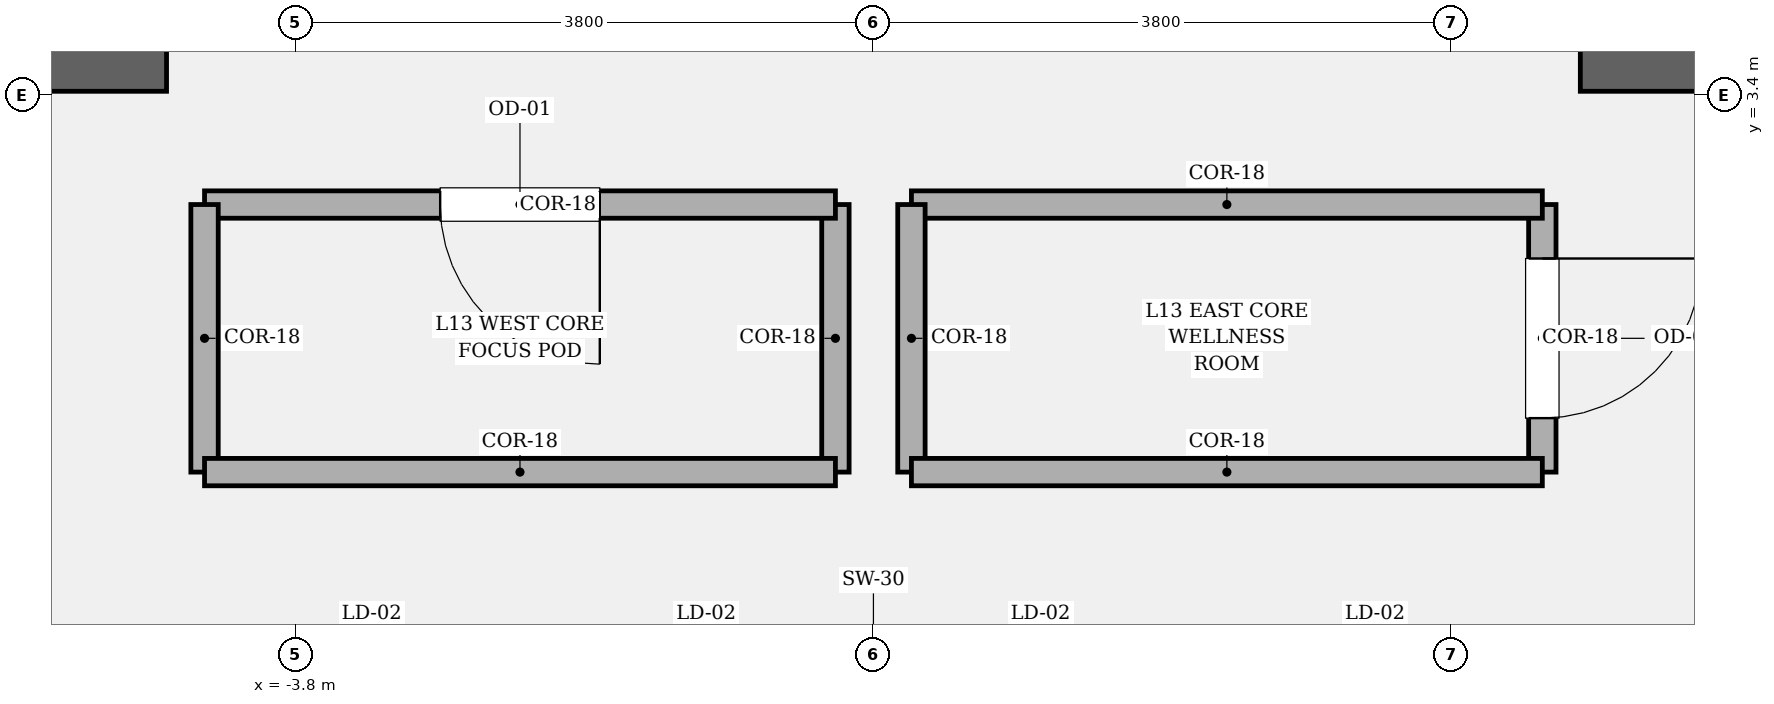
"""IFC4 building model, lengths in metres.
Left out: names, types, materials, properties, quantities, classifications, styles, units other than length and angle.
Written with IfcOpenShell. Run it as: python <this file> out.ifc"""

import sys

from ifc_helpers import new_model, si_unit, direction, frame, frame_2d, origin, place, context, subcontext, project, spatial, rectangle, extrude, element, fill, save


model = new_model("IFC4")
c1 = context("Model", 3, precision=1e-05, world=origin(), true_north=direction((0.0, 1.0)))
c2 = subcontext(c1, "Body", "Model", "MODEL_VIEW")
j1 = project(units=[si_unit("LENGTHUNIT", "METRE"), si_unit("PLANEANGLEUNIT", "RADIAN")], contexts=[c1])
p1 = place(None, origin())
s1 = spatial("IfcSite", under=j1, at=p1, CompositionType="ELEMENT")
p2 = place(p1, origin())
s2 = spatial("IfcBuilding", under=s1, at=p2, CompositionType="ELEMENT")
p3 = place(p2, frame((0.0, 0.0, 60.6)))
s3 = spatial("IfcBuildingStorey", under=s2, at=p3, CompositionType="ELEMENT", Elevation=60.6)
for number, where, z_axis, x_axis in (
    (1, (-9.825, 3.6, 0.0), (0.0, 0.0, 1.0), (1.0, 0.0, 0.0)),
    (2, (4.65, 3.6, 0.0), (0.0, 0.0, 1.0), (1.0, 0.0, 0.0)),
):
    element("IfcWall", number, at=place(p3, frame(where, z_axis=z_axis, x_axis=x_axis)), inside=s3, PredefinedType="SOLIDWALL", context=c2, shape_type="SweptSolid", body=[
        extrude(rectangle(XDim=5.175, YDim=0.35, at=frame_2d((2.587, 0.0))), origin(), (0.0, 0.0, 1.0), 4.05),
    ])
p4 = place(p3, frame((-0.25, 0.92, 0.0), z_axis=(0.0, 0.0, 1.0), x_axis=(0.0, 1.0, 0.0)))
e3 = element("IfcWall", 3, at=p4, inside=s3, PredefinedType="PARTITIONING", context=c2, shape_type="SweptSolid", body=[
    extrude(rectangle(XDim=1.76, YDim=0.18, at=frame_2d((0.88, 0.0))), origin(), (0.0, 0.0, 1.0), 3.81),
])
p5 = place(p3, frame((-0.25, 2.68, 0.0), z_axis=(0.0, 0.0, 1.0), x_axis=(-1.0, 0.0, 0.0)))
e4 = element("IfcWall", 4, at=p5, inside=s3, PredefinedType="PARTITIONING", context=c2, shape_type="SweptSolid", body=[
    extrude(rectangle(XDim=4.15, YDim=0.18, at=frame_2d((2.075, 0.0))), origin(), (0.0, 0.0, 1.0), 3.81),
])
p6 = place(p5, frame((1.55, 0.0, 0.0)))
e5 = element("IfcOpeningElement", 5, at=p6, cuts=e4, PredefinedType="OPENING", context=c2, shape_type="SweptSolid", body=[
    extrude(rectangle(XDim=1.05, YDim=2.2, at=frame_2d((0.525, 1.1))), frame((0.0, 0.1, 0.0), z_axis=(0.0, -1.0, 0.0), x_axis=(1.0, 0.0, 0.0)), (0.0, 0.0, 1.0), 0.2),
])
p7 = place(p3, frame((-4.4, 2.68, 0.0), z_axis=(0.0, 0.0, 1.0), x_axis=(0.0, -1.0, 0.0)))
e6 = element("IfcWall", 6, at=p7, inside=s3, PredefinedType="PARTITIONING", context=c2, shape_type="SweptSolid", body=[
    extrude(rectangle(XDim=1.76, YDim=0.18, at=frame_2d((0.88, 0.0))), origin(), (0.0, 0.0, 1.0), 3.81),
])
p8 = place(p3, frame((-4.4, 0.92, 0.0), z_axis=(0.0, 0.0, 1.0), x_axis=(1.0, 0.0, 0.0)))
e7 = element("IfcWall", 7, at=p8, inside=s3, PredefinedType="PARTITIONING", context=c2, shape_type="SweptSolid", body=[
    extrude(rectangle(XDim=4.15, YDim=0.18, at=frame_2d((2.075, 0.0))), origin(), (0.0, 0.0, 1.0), 3.81),
])
p9 = place(p3, frame((4.4, 0.92, 0.0), z_axis=(0.0, 0.0, 1.0), x_axis=(0.0, 1.0, 0.0)))
e8 = element("IfcWall", 8, at=p9, inside=s3, PredefinedType="PARTITIONING", context=c2, shape_type="SweptSolid", body=[
    extrude(rectangle(XDim=1.76, YDim=0.18, at=frame_2d((0.88, 0.0))), origin(), (0.0, 0.0, 1.0), 3.81),
])
p10 = place(p9, frame((0.355, 0.0, 0.0)))
e9 = element("IfcOpeningElement", 9, at=p10, cuts=e8, PredefinedType="OPENING", context=c2, shape_type="SweptSolid", body=[
    extrude(rectangle(XDim=1.05, YDim=2.2, at=frame_2d((0.525, 1.1))), frame((0.0, 0.1, 0.0), z_axis=(0.0, -1.0, 0.0), x_axis=(1.0, 0.0, 0.0)), (0.0, 0.0, 1.0), 0.2),
])
p11 = place(p3, frame((4.4, 2.68, 0.0), z_axis=(0.0, 0.0, 1.0), x_axis=(-1.0, 0.0, 0.0)))
e10 = element("IfcWall", 10, at=p11, inside=s3, PredefinedType="PARTITIONING", context=c2, shape_type="SweptSolid", body=[
    extrude(rectangle(XDim=4.15, YDim=0.18, at=frame_2d((2.075, 0.0))), origin(), (0.0, 0.0, 1.0), 3.81),
])
p12 = place(p3, frame((0.25, 2.68, 0.0), z_axis=(0.0, 0.0, 1.0), x_axis=(0.0, -1.0, 0.0)))
e11 = element("IfcWall", 11, at=p12, inside=s3, PredefinedType="PARTITIONING", context=c2, shape_type="SweptSolid", body=[
    extrude(rectangle(XDim=1.76, YDim=0.18, at=frame_2d((0.88, 0.0))), origin(), (0.0, 0.0, 1.0), 3.81),
])
p13 = place(p3, frame((0.25, 0.92, 0.0), z_axis=(0.0, 0.0, 1.0), x_axis=(1.0, 0.0, 0.0)))
e12 = element("IfcWall", 12, at=p13, inside=s3, PredefinedType="PARTITIONING", context=c2, shape_type="SweptSolid", body=[
    extrude(rectangle(XDim=4.15, YDim=0.18, at=frame_2d((2.075, 0.0))), origin(), (0.0, 0.0, 1.0), 3.81),
])
p14 = place(p6, origin())
e13 = element("IfcDoor", 13, at=p14, inside=s3, OperationType="SINGLE_SWING_LEFT", PredefinedType="DOOR", context=c2, shape_type="SweptSolid", body=[
    extrude(rectangle(XDim=1.05, YDim=2.2, at=frame_2d((0.525, 1.1))), frame((0.0, 0.025, 0.0), z_axis=(0.0, -1.0, 0.0), x_axis=(1.0, 0.0, 0.0)), (0.0, 0.0, 1.0), 0.05),
])
fill(e5, e13)
p15 = place(p10, origin())
e14 = element("IfcDoor", 14, at=p15, inside=s3, OperationType="SINGLE_SWING_RIGHT", PredefinedType="DOOR", context=c2, shape_type="SweptSolid", body=[
    extrude(rectangle(XDim=1.05, YDim=2.2, at=frame_2d((0.525, 1.1))), frame((0.0, 0.025, 0.0), z_axis=(0.0, -1.0, 0.0), x_axis=(1.0, 0.0, 0.0)), (0.0, 0.0, 1.0), 0.05),
])
fill(e9, e14)
save(model, sys.argv[1])
